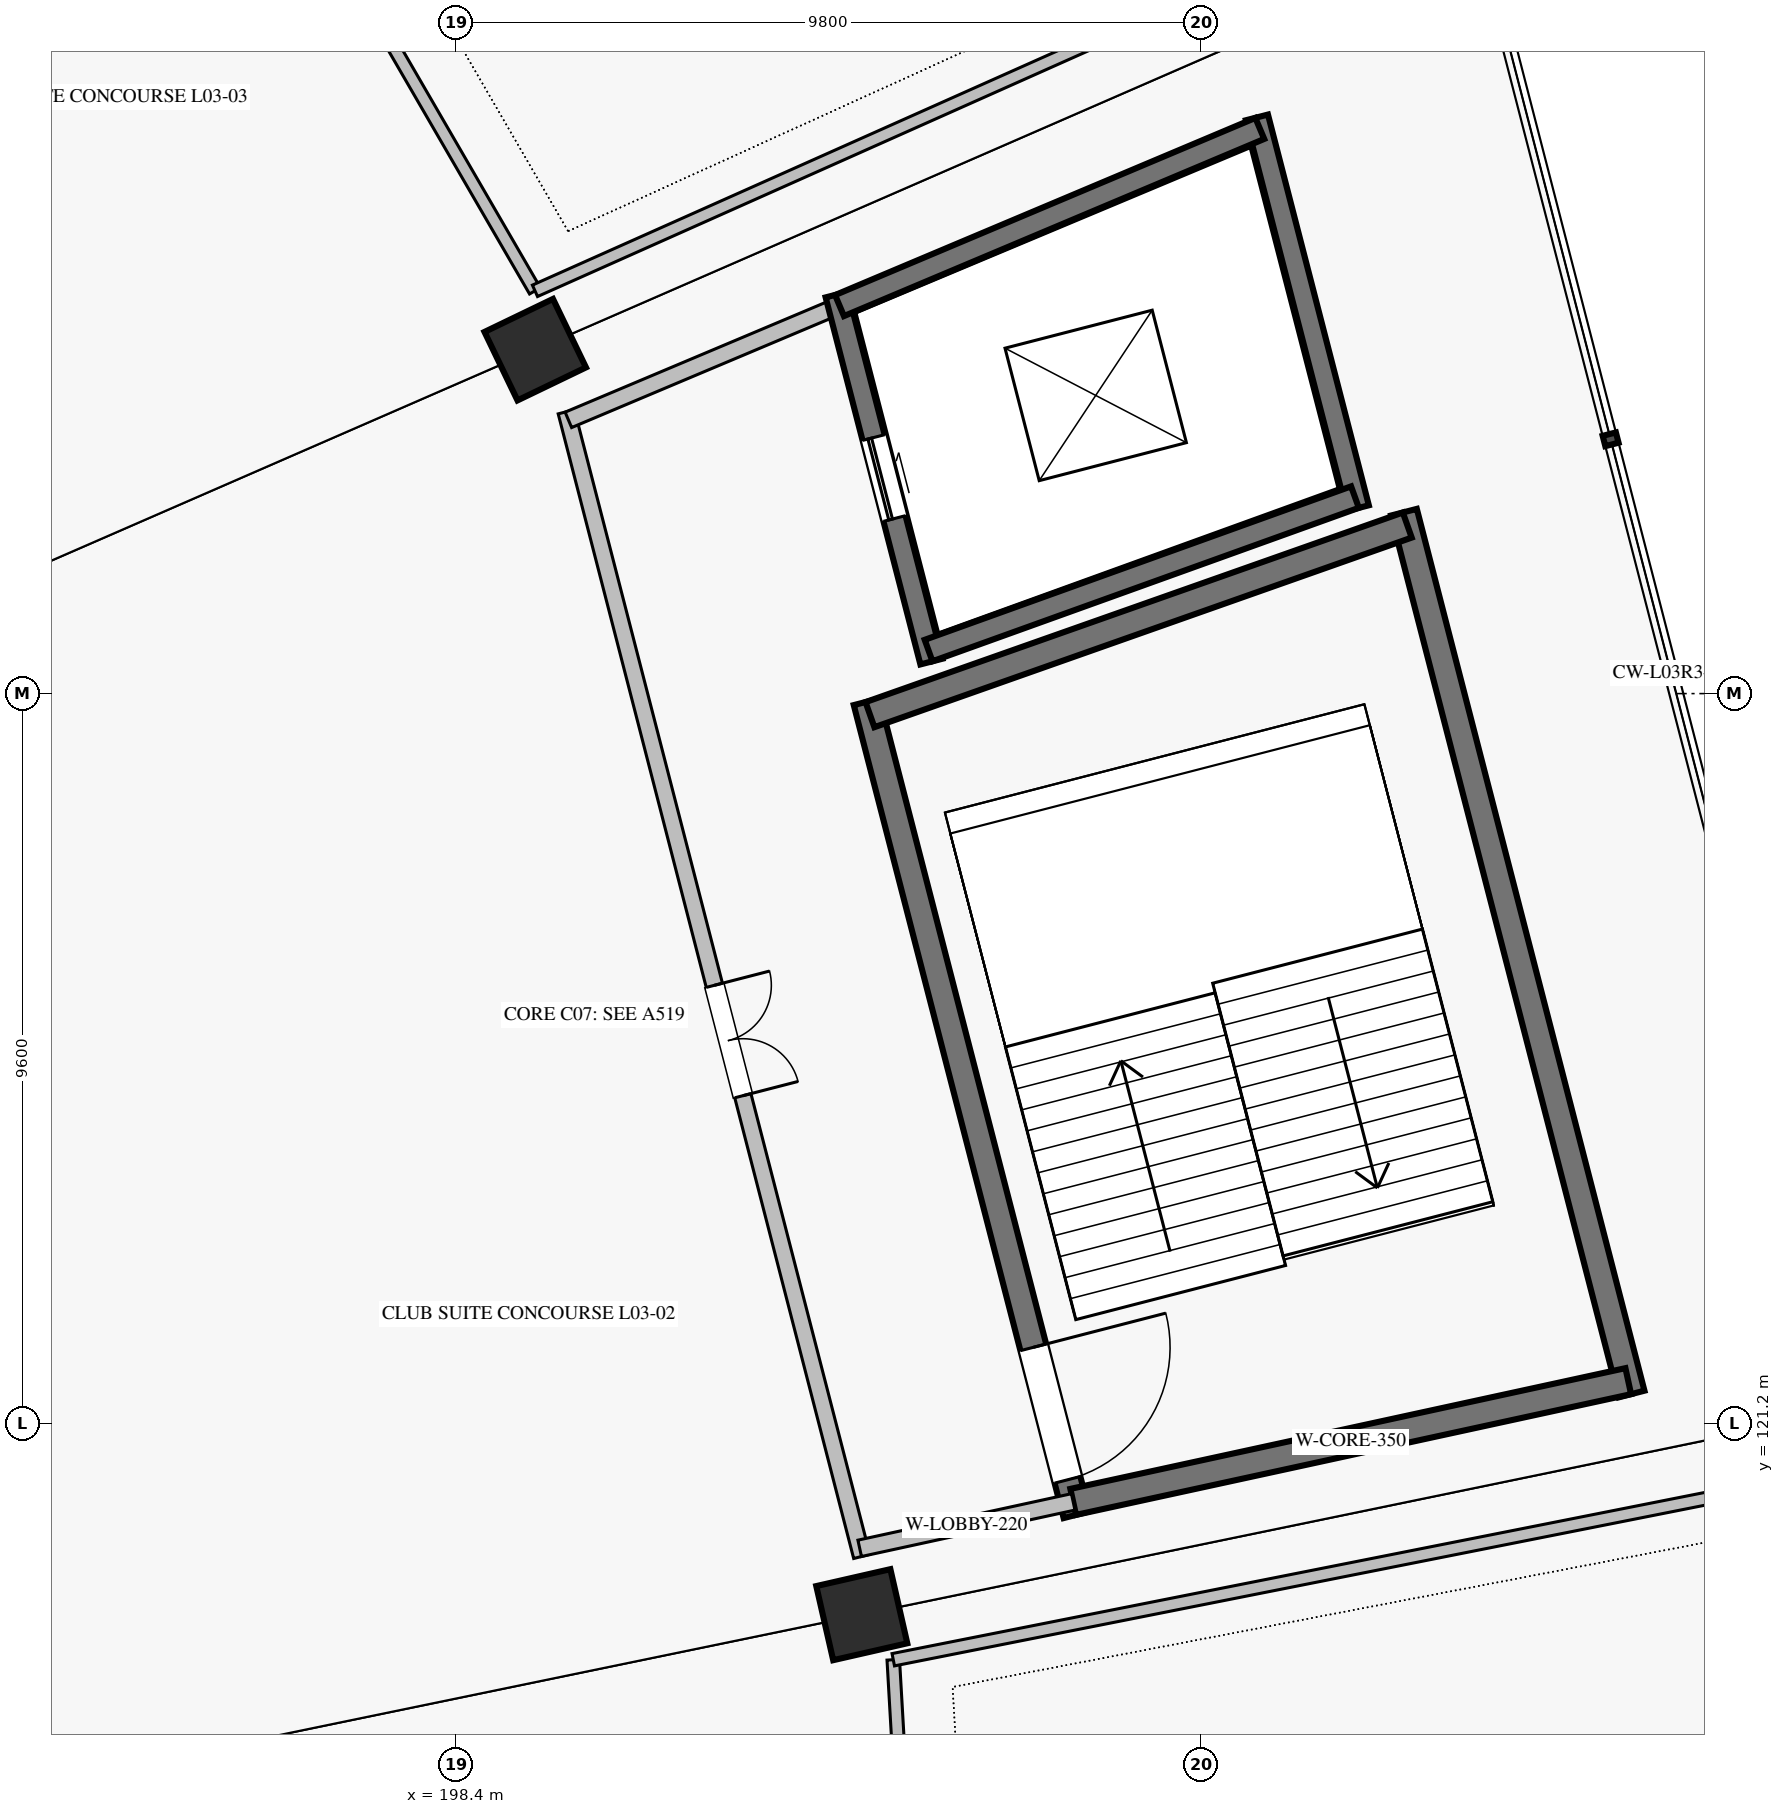
"""IFC4 building model, lengths in metres.
Left out: names, types, materials, properties, quantities, classifications, styles, units other than length and angle.
Written with IfcOpenShell. Run it as: python <this file> out.ifc"""

import sys

from ifc_helpers import new_model, si_unit, direction, frame, frame_2d, origin, origin_2d, place, context, subcontext, project, spatial, rectangle, extrude, element, fill, save


model = new_model("IFC4")
c1 = context("Model", 3, precision=1e-05, world=origin(), true_north=direction((0.0, 1.0)))
c2 = subcontext(c1, "Body", "Model", "MODEL_VIEW")
j1 = project(units=[si_unit("LENGTHUNIT", "METRE"), si_unit("PLANEANGLEUNIT", "RADIAN")], contexts=[c1])
p1 = place(None, origin())
s1 = spatial("IfcSite", under=j1, at=p1, CompositionType="ELEMENT")
p2 = place(p1, origin())
s2 = spatial("IfcBuilding", under=s1, at=p2, CompositionType="ELEMENT")
p3 = place(p2, frame((0.0, 0.0, 15.64)))
s3 = spatial("IfcBuildingStorey", under=s2, at=p3, CompositionType="ELEMENT", Elevation=15.64)
for number, where, z_axis, x_axis in (
    (1, (203.738, 118.682, 0.0), (0.0, 0.0, 1.0), (0.975, 0.223, 0.0)),
    (2, (199.441, 135.325, 0.0), (0.0, 0.0, 1.0), (0.901, 0.434, 0.0)),
):
    element("IfcColumn", number, at=place(p3, frame(where, z_axis=z_axis, x_axis=x_axis)), inside=s3, PredefinedType="COLUMN", context=c2, shape_type="SweptSolid", body=[
        extrude(rectangle(XDim=1.0, YDim=1.0, at=origin_2d()), origin(), (0.0, 0.0, 1.0), 4.76),
    ])
p4 = place(p3, frame((206.562, 119.996, 0.0), z_axis=(0.0, 0.0, 1.0), x_axis=(-0.249959564539, 0.968256276042, 0.0)))
e3 = element("IfcWall", 3, at=p4, inside=s3, PredefinedType="SHEAR", context=c2, shape_type="SweptSolid", body=[
    extrude(rectangle(XDim=11.047, YDim=0.35, at=frame_2d((5.523, 0.0))), origin(), (0.0, 0.0, 1.0), 4.46),
])
p5 = place(p4, frame((0.475, 0.0, 0.0)))
e4 = element("IfcOpeningElement", 4, at=p5, cuts=e3, PredefinedType="OPENING", context=c2, shape_type="SweptSolid", body=[
    extrude(rectangle(XDim=1.8, YDim=2.2, at=frame_2d((0.9, 1.1))), frame((0.0, 0.185, 0.0), z_axis=(0.0, -1.0, 0.0), x_axis=(1.0, 0.0, 0.0)), (0.0, 0.0, 1.0), 0.37),
])
p6 = place(p3, frame((213.866, 121.585, 0.0), z_axis=(0.0, 0.0, 1.0), x_axis=(-0.249969221583, 0.968253782983, 0.0)))
e5 = element("IfcWall", 5, at=p6, inside=s3, PredefinedType="SHEAR", context=c2, shape_type="SweptSolid", body=[
    extrude(rectangle(XDim=11.982, YDim=0.35, at=frame_2d((5.991, 0.0))), origin(), (0.0, 0.0, 1.0), 4.46),
])
p7 = place(p3, frame((206.519, 120.166, 0.0), z_axis=(0.0, 0.0, 1.0), x_axis=(0.977149528138, 0.2125530514, 0.0)))
e6 = element("IfcWall", 6, at=p7, inside=s3, PredefinedType="SHEAR", context=c2, shape_type="SweptSolid", body=[
    extrude(rectangle(XDim=7.474, YDim=0.35, at=frame_2d((3.737, 0.0))), origin(), (0.0, 0.0, 1.0), 4.46),
])
p8 = place(p3, frame((203.845, 130.523, 0.0), z_axis=(0.0, 0.0, 1.0), x_axis=(0.943032412173, 0.332700871042, 0.0)))
e7 = element("IfcWall", 7, at=p8, inside=s3, PredefinedType="SHEAR", context=c2, shape_type="SweptSolid", body=[
    extrude(rectangle(XDim=7.497, YDim=0.35, at=frame_2d((3.748, 0.0))), origin(), (0.0, 0.0, 1.0), 4.46),
])
p9 = place(p3, frame((204.654, 131.221, 0.0), z_axis=(0.0, 0.0, 1.0), x_axis=(-0.250003862389, 0.968244839279, 0.0)))
e8 = element("IfcWall", 8, at=p9, inside=s3, PredefinedType="SHEAR", context=c2, shape_type="SweptSolid", body=[
    extrude(rectangle(XDim=4.987, YDim=0.3, at=frame_2d((2.494, 0.0))), origin(), (0.0, 0.0, 1.0), 4.46),
])
p10 = place(p9, frame((1.944, 0.0, 0.0)))
e9 = element("IfcOpeningElement", 9, at=p10, cuts=e8, PredefinedType="OPENING", context=c2, shape_type="SweptSolid", body=[
    extrude(rectangle(XDim=1.1, YDim=2.2, at=frame_2d((0.55, 1.1))), frame((0.0, 0.16, 0.0), z_axis=(0.0, -1.0, 0.0), x_axis=(1.0, 0.0, 0.0)), (0.0, 0.0, 1.0), 0.32),
])
p11 = place(p3, frame((210.264, 133.24, 0.0), z_axis=(0.0, 0.0, 1.0), x_axis=(-0.249961459705, 0.968255786795, 0.0)))
e10 = element("IfcWall", 10, at=p11, inside=s3, PredefinedType="SHEAR", context=c2, shape_type="SweptSolid", body=[
    extrude(rectangle(XDim=5.309, YDim=0.3, at=frame_2d((2.655, 0.0))), origin(), (0.0, 0.0, 1.0), 4.46),
])
p12 = place(p3, frame((204.616, 131.366, 0.0), z_axis=(0.0, 0.0, 1.0), x_axis=(0.940945340179, 0.338558513103, 0.0)))
e11 = element("IfcWall", 11, at=p12, inside=s3, PredefinedType="SHEAR", context=c2, shape_type="SweptSolid", body=[
    extrude(rectangle(XDim=5.962, YDim=0.3, at=frame_2d((2.981, 0.0))), origin(), (0.0, 0.0, 1.0), 4.46),
])
p13 = place(p3, frame((203.445, 135.905, 0.0), z_axis=(0.0, 0.0, 1.0), x_axis=(0.92149593043, 0.388388015007, 0.0)))
e12 = element("IfcWall", 12, at=p13, inside=s3, PredefinedType="SHEAR", context=c2, shape_type="SweptSolid", body=[
    extrude(rectangle(XDim=6.001, YDim=0.3, at=frame_2d((3.0, 0.0))), origin(), (0.0, 0.0, 1.0), 4.46),
])
p14 = place(p3, frame((203.737, 119.448, 0.0), z_axis=(0.0, 0.0, 1.0), x_axis=(-0.249963472505, 0.968255267176, 0.0)))
e13 = element("IfcWall", 13, at=p14, inside=s3, PredefinedType="SOLIDWALL", context=c2, shape_type="SweptSolid", body=[
    extrude(rectangle(XDim=15.553, YDim=0.22, at=frame_2d((7.776, 0.0))), origin(), (0.0, 0.0, 1.0), 4.46),
])
p15 = place(p14, frame((6.26, 0.0, 0.0)))
e14 = element("IfcOpeningElement", 14, at=p15, cuts=e13, PredefinedType="OPENING", context=c2, shape_type="SweptSolid", body=[
    extrude(rectangle(XDim=1.5, YDim=2.2, at=frame_2d((0.75, 1.1))), frame((0.0, 0.12, 0.0), z_axis=(0.0, -1.0, 0.0), x_axis=(1.0, 0.0, 0.0)), (0.0, 0.0, 1.0), 0.24),
])
p16 = place(p3, frame((203.71, 119.555, 0.0), z_axis=(0.0, 0.0, 1.0), x_axis=(0.977160263607, 0.212503692268, 0.0)))
e15 = element("IfcWall", 15, at=p16, inside=s3, PredefinedType="SOLIDWALL", context=c2, shape_type="SweptSolid", body=[
    extrude(rectangle(XDim=2.875, YDim=0.22, at=frame_2d((1.437, 0.0))), origin(), (0.0, 0.0, 1.0), 4.46),
])
p17 = place(p3, frame((199.877, 134.401, 0.0), z_axis=(0.0, 0.0, 1.0), x_axis=(0.921486922561, 0.388409386535, 0.0)))
e16 = element("IfcWall", 16, at=p17, inside=s3, PredefinedType="SOLIDWALL", context=c2, shape_type="SweptSolid", body=[
    extrude(rectangle(XDim=3.871, YDim=0.22, at=frame_2d((1.936, 0.0))), origin(), (0.0, 0.0, 1.0), 4.46),
])
p18 = place(p3, frame((205.041, 102.67, 0.0), z_axis=(0.0, 0.0, 1.0), x_axis=(-0.057603503798, 0.998339539611, 0.0)))
e17 = element("IfcWall", 17, at=p18, inside=s3, PredefinedType="PARTITIONING", context=c2, shape_type="SweptSolid", body=[
    extrude(rectangle(XDim=15.444, YDim=0.165, at=frame_2d((7.722, 0.0))), origin(), (0.0, 0.0, 1.0), 3.78),
])
p19 = place(p18, frame((7.172, 0.0, 0.0)))
e18 = element("IfcOpeningElement", 18, at=p19, cuts=e17, PredefinedType="OPENING", context=c2, shape_type="SweptSolid", body=[
    extrude(rectangle(XDim=1.1, YDim=2.25, at=frame_2d((0.55, 1.125))), frame((0.0, 0.093, 0.0), z_axis=(0.0, -1.0, 0.0), x_axis=(1.0, 0.0, 0.0)), (0.0, 0.0, 1.0), 0.185),
])
p20 = place(p3, frame((204.152, 118.089, 0.0), z_axis=(0.0, 0.0, 1.0), x_axis=(0.980904167784, 0.194491680088, 0.0)))
e19 = element("IfcWall", 19, at=p20, inside=s3, PredefinedType="PARTITIONING", context=c2, shape_type="SweptSolid", body=[
    extrude(rectangle(XDim=12.257, YDim=0.165, at=frame_2d((6.128, 0.0))), origin(), (0.0, 0.0, 1.0), 3.78),
])
p21 = place(p3, frame((199.438, 136.099, 0.0), z_axis=(0.0, 0.0, 1.0), x_axis=(-0.501617777052, 0.865089362867, 0.0)))
e20 = element("IfcWall", 20, at=p21, inside=s3, PredefinedType="PARTITIONING", context=c2, shape_type="SweptSolid", body=[
    extrude(rectangle(XDim=16.464, YDim=0.165, at=frame_2d((8.232, 0.0))), origin(), (0.0, 0.0, 1.0), 3.78),
])
p22 = place(p21, frame((7.682, 0.0, 0.0)))
e21 = element("IfcOpeningElement", 21, at=p22, cuts=e20, PredefinedType="OPENING", context=c2, shape_type="SweptSolid", body=[
    extrude(rectangle(XDim=1.1, YDim=2.25, at=frame_2d((0.55, 1.125))), frame((0.0, 0.093, 0.0), z_axis=(0.0, -1.0, 0.0), x_axis=(1.0, 0.0, 0.0)), (0.0, 0.0, 1.0), 0.185),
])
p23 = place(p3, frame((199.438, 136.099, 0.0), z_axis=(0.0, 0.0, 1.0), x_axis=(0.913245562849, 0.407409550621, 0.0)))
e22 = element("IfcWall", 22, at=p23, inside=s3, PredefinedType="PARTITIONING", context=c2, shape_type="SweptSolid", body=[
    extrude(rectangle(XDim=12.4, YDim=0.165, at=frame_2d((6.2, 0.0))), origin(), (0.0, 0.0, 1.0), 3.78),
])
p24 = place(p5, frame((1.8, 0.0, 0.0), z_axis=(0.0, 0.0, 1.0), x_axis=(-1.0, 0.0, 0.0)))
e23 = element("IfcDoor", 23, at=p24, inside=s3, OperationType="SINGLE_SWING_LEFT", PredefinedType="DOOR", context=c2, shape_type="SweptSolid", body=[
    extrude(rectangle(XDim=1.8, YDim=2.2, at=frame_2d((0.9, 1.1))), frame((0.0, 0.025, 0.0), z_axis=(0.0, -1.0, 0.0), x_axis=(1.0, 0.0, 0.0)), (0.0, 0.0, 1.0), 0.05),
])
fill(e4, e23)
p25 = place(p10, origin())
e24 = element("IfcDoor", 24, at=p25, inside=s3, OperationType="SLIDING_TO_RIGHT", PredefinedType="DOOR", context=c2, shape_type="SweptSolid", body=[
    extrude(rectangle(XDim=1.1, YDim=2.2, at=frame_2d((0.55, 1.1))), frame((0.0, 0.025, 0.0), z_axis=(0.0, -1.0, 0.0), x_axis=(1.0, 0.0, 0.0)), (0.0, 0.0, 1.0), 0.05),
])
fill(e9, e24)
p26 = place(p15, frame((1.5, 0.0, 0.0), z_axis=(0.0, 0.0, 1.0), x_axis=(-1.0, 0.0, 0.0)))
e25 = element("IfcDoor", 25, at=p26, inside=s3, OperationType="DOUBLE_DOOR_SINGLE_SWING", PredefinedType="DOOR", context=c2, shape_type="SweptSolid", body=[
    extrude(rectangle(XDim=1.5, YDim=2.2, at=frame_2d((0.75, 1.1))), frame((0.0, 0.025, 0.0), z_axis=(0.0, -1.0, 0.0), x_axis=(1.0, 0.0, 0.0)), (0.0, 0.0, 1.0), 0.05),
])
fill(e14, e25)
save(model, sys.argv[1])
